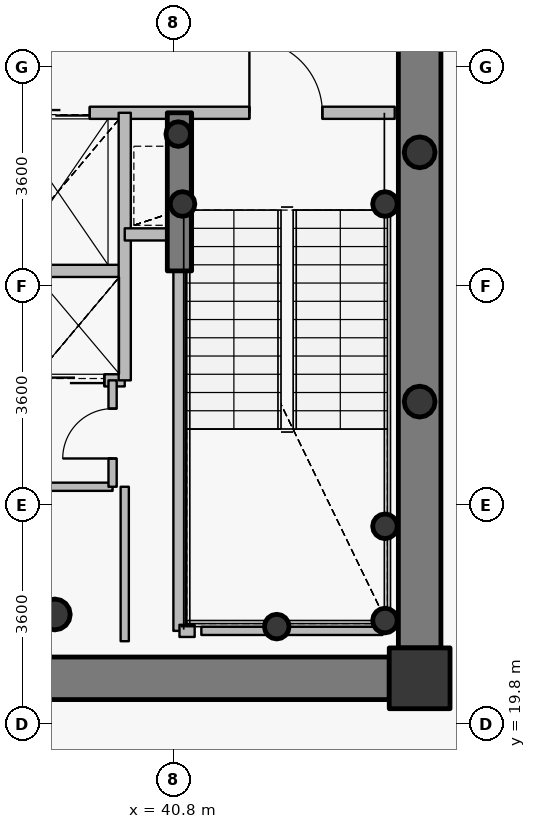
"""IFC4 building model, lengths in metres.
Left out: names, types, materials, properties, quantities, classifications, styles, units other than length and angle.
Written with IfcOpenShell. Run it as: python <this file> out.ifc"""

import sys

from ifc_helpers import new_model, si_unit, direction, frame, frame_2d, origin, origin_2d, place, context, subcontext, project, spatial, rectangle, hollow_circle, extrude, source, transform, mapped, element, fill, save


model = new_model("IFC4")
c1 = context("Model", 3, precision=1e-05, world=origin(), true_north=direction((0.0, 1.0)))
c2 = subcontext(c1, "Body", "Model", "MODEL_VIEW")
j1 = project(units=[si_unit("LENGTHUNIT", "METRE"), si_unit("PLANEANGLEUNIT", "RADIAN")], contexts=[c1])
p1 = place(None, origin())
s1 = spatial("IfcSite", under=j1, at=p1, CompositionType="ELEMENT")
p2 = place(p1, origin())
s2 = spatial("IfcBuilding", under=s1, at=p2, CompositionType="ELEMENT")
p3 = place(p2, frame((0.0, 0.0, 306.75)))
s3 = spatial("IfcBuildingStorey", under=s2, at=p3, CompositionType="ELEMENT", Elevation=306.75)
p4 = place(p3, frame((44.85, 20.55, 0.0), z_axis=(0.0, 0.0, 1.0), x_axis=(1.0, 0.0, 0.0)))
e1 = element("IfcColumn", 1, at=p4, inside=s3, PredefinedType="COLUMN", context=c2, shape_type="SweptSolid", body=[
    extrude(rectangle(XDim=1.0, YDim=1.0, at=origin_2d()), origin(), (0.0, 0.0, 1.0), 3.75),
])
p5 = place(p3, frame((38.85, 21.6, 0.0), z_axis=(0.0, 0.0, 1.0), x_axis=(1.0, 0.0, 0.0)))
e2 = element("IfcColumn", 2, at=p5, inside=s3, PredefinedType="COLUMN", context=c2, shape_type="SweptSolid", body=[
    extrude(hollow_circle(Radius=0.254, WallThickness=0.02, at=origin_2d()), origin(), (0.0, 0.0, 1.0), 3.75),
])
for number, where, z_axis, x_axis in (
    (3, (44.28, 21.5, 0.0), (0.0, 0.0, 1.0), (1.0, 0.0, 0.0)),
    (4, (44.28, 23.05, 0.0), (0.0, 0.0, 1.0), (1.0, 0.0, 0.0)),
    (5, (42.5, 21.4, 0.0), (0.0, 0.0, 1.0), (1.0, 0.0, 0.0)),
    (6, (40.95, 28.35, 0.0), (0.0, 0.0, 1.0), (1.0, 0.0, 0.0)),
    (7, (44.28, 28.35, 0.0), (0.0, 0.0, 1.0), (1.0, 0.0, 0.0)),
    (8, (40.88, 29.5, 0.0), (0.0, 0.0, 1.0), (1.0, 0.0, 0.0)),
):
    element("IfcColumn", number, at=place(p3, frame(where, z_axis=z_axis, x_axis=x_axis)), inside=s3, PredefinedType="COLUMN", context=c2, shape_type="SweptSolid", body=[
        extrude(hollow_circle(Radius=0.203, WallThickness=0.016, at=origin_2d()), origin(), (0.0, 0.0, 1.0), 3.75),
    ])
p6 = place(p3, frame((44.85, 32.95, 0.0), z_axis=(0.0, 0.0, 1.0), x_axis=(0.0, -1.0, 0.0)))
e9 = element("IfcWall", 9, at=p6, inside=s3, PredefinedType="SHEAR", context=c2, shape_type="SweptSolid", body=[
    extrude(rectangle(XDim=11.9, YDim=0.7, at=frame_2d((5.95, 0.0))), origin(), (0.0, 0.0, 1.0), 3.05),
])
p7 = place(p3, frame((44.35, 20.55, 0.0), z_axis=(0.0, 0.0, 1.0), x_axis=(-1.0, 0.0, 0.0)))
e10 = element("IfcWall", 10, at=p7, inside=s3, PredefinedType="SHEAR", context=c2, shape_type="SweptSolid", body=[
    extrude(rectangle(XDim=16.7, YDim=0.7, at=frame_2d((8.35, 0.0))), origin(), (0.0, 0.0, 1.0), 3.05),
])
p8 = place(p7, frame((12.925, 0.0, 0.0)))
e11 = element("IfcOpeningElement", 11, at=p8, cuts=e10, PredefinedType="OPENING", context=c2, shape_type="SweptSolid", body=[
    extrude(rectangle(XDim=1.15, YDim=2.15, at=origin_2d()), frame((0.575, 0.36, 1.075), z_axis=(0.0, -1.0, 0.0), x_axis=(1.0, 0.0, 0.0)), (0.0, 0.0, 1.0), 0.72),
])
p9 = place(p7, frame((9.1, 0.0, 0.0)))
e12 = element("IfcOpeningElement", 12, at=p9, cuts=e10, PredefinedType="OPENING", context=c2, shape_type="SweptSolid", body=[
    extrude(rectangle(XDim=1.15, YDim=2.15, at=origin_2d()), frame((0.575, 0.36, 1.075), z_axis=(0.0, -1.0, 0.0), x_axis=(1.0, 0.0, 0.0)), (0.0, 0.0, 1.0), 0.72),
])
p10 = place(p3, frame((40.9, 27.25, 0.0), z_axis=(0.0, 0.0, 1.0), x_axis=(0.0, 1.0, 0.0)))
e13 = element("IfcWall", 13, at=p10, inside=s3, PredefinedType="SHEAR", context=c2, shape_type="SweptSolid", body=[
    extrude(rectangle(XDim=2.6, YDim=0.4, at=frame_2d((1.3, 0.0))), origin(), (0.0, 0.0, 1.0), 3.1),
])
for number, where, z_axis, x_axis in (
    (14, (44.85, 25.1, 0.0), (0.0, 0.0, 1.0), (1.0, 0.0, 0.0)),
    (15, (44.85, 29.2, 0.0), (0.0, 0.0, 1.0), (1.0, 0.0, 0.0)),
):
    element("IfcColumn", number, at=place(p3, frame(where, z_axis=z_axis, x_axis=x_axis)), inside=s3, PredefinedType="COLUMN", context=c2, shape_type="SweptSolid", body=[
        extrude(hollow_circle(Radius=0.254, WallThickness=0.02, at=origin_2d()), origin(), (0.0, 0.0, 1.0), 3.75),
    ])
p11 = place(p3, frame((35.05, 27.25, 0.0), z_axis=(0.0, 0.0, 1.0), x_axis=(1.0, 0.0, 0.0)))
e16 = element("IfcWall", 16, at=p11, inside=s3, PredefinedType="PARTITIONING", context=c2, shape_type="SweptSolid", body=[
    extrude(rectangle(XDim=4.95, YDim=0.2, at=frame_2d((2.475, 0.0))), origin(), (0.0, 0.0, 1.0), 3.085),
])
p12 = place(p3, frame((35.45, 23.7, 0.0), z_axis=(0.0, 0.0, 1.0), x_axis=(1.0, 0.0, 0.0)))
e17 = element("IfcWall", 17, at=p12, inside=s3, PredefinedType="PARTITIONING", context=c2, shape_type="SweptSolid", body=[
    extrude(rectangle(XDim=4.35, YDim=0.135, at=frame_2d((2.175, 0.0))), origin(), (0.0, 0.0, 1.0), 3.085),
])
p13 = place(p12, frame((1.625, 0.0, 0.0)))
e18 = element("IfcOpeningElement", 18, at=p13, cuts=e17, PredefinedType="OPENING", context=c2, shape_type="SweptSolid", body=[
    extrude(rectangle(XDim=1.1, YDim=2.15, at=origin_2d()), frame((0.55, 0.078, 1.075), z_axis=(0.0, -1.0, 0.0), x_axis=(1.0, 0.0, 0.0)), (0.0, 0.0, 1.0), 0.155),
])
p14 = place(p3, frame((35.45, 25.45, 0.0), z_axis=(0.0, 0.0, 1.0), x_axis=(1.0, 0.0, 0.0)))
e19 = element("IfcWall", 19, at=p14, inside=s3, PredefinedType="PARTITIONING", context=c2, shape_type="SweptSolid", body=[
    extrude(rectangle(XDim=4.55, YDim=0.2, at=frame_2d((2.275, 0.0))), origin(), (0.0, 0.0, 1.0), 3.085),
])
p15 = place(p14, frame((0.25, 0.0, 0.0)))
e20 = element("IfcOpeningElement", 20, at=p15, cuts=e19, PredefinedType="OPENING", context=c2, shape_type="SweptSolid", body=[
    extrude(rectangle(XDim=1.05, YDim=2.15, at=origin_2d()), frame((0.525, 0.11, 1.075), z_axis=(0.0, -1.0, 0.0), x_axis=(1.0, 0.0, 0.0)), (0.0, 0.0, 1.0), 0.22),
])
p16 = place(p14, frame((1.745, 0.0, 0.0)))
e21 = element("IfcOpeningElement", 21, at=p16, cuts=e19, PredefinedType="OPENING", context=c2, shape_type="SweptSolid", body=[
    extrude(rectangle(XDim=1.05, YDim=2.15, at=origin_2d()), frame((0.525, 0.11, 1.075), z_axis=(0.0, -1.0, 0.0), x_axis=(1.0, 0.0, 0.0)), (0.0, 0.0, 1.0), 0.22),
])
p17 = place(p14, frame((3.165, 0.0, 0.0)))
e22 = element("IfcOpeningElement", 22, at=p17, cuts=e19, PredefinedType="OPENING", context=c2, shape_type="SweptSolid", body=[
    extrude(rectangle(XDim=1.05, YDim=2.15, at=origin_2d()), frame((0.525, 0.11, 1.075), z_axis=(0.0, -1.0, 0.0), x_axis=(1.0, 0.0, 0.0)), (0.0, 0.0, 1.0), 0.22),
])
p18 = place(p3, frame((35.95, 29.85, 0.0), z_axis=(0.0, 0.0, 1.0), x_axis=(1.0, 0.0, 0.0)))
e23 = element("IfcWall", 23, at=p18, inside=s3, PredefinedType="PARTITIONING", context=c2, shape_type="SweptSolid", body=[
    extrude(rectangle(XDim=8.49, YDim=0.2, at=frame_2d((4.245, 0.0))), origin(), (0.0, 0.0, 1.0), 3.085),
])
p19 = place(p18, frame((6.1, 0.0, 0.0)))
e24 = element("IfcOpeningElement", 24, at=p19, cuts=e23, PredefinedType="OPENING", context=c2, shape_type="SweptSolid", body=[
    extrude(rectangle(XDim=1.2, YDim=2.15, at=origin_2d()), frame((0.6, 0.11, 1.075), z_axis=(0.0, -1.0, 0.0), x_axis=(1.0, 0.0, 0.0)), (0.0, 0.0, 1.0), 0.22),
])
p20 = place(p18, frame((0.37, 0.0, 0.0)))
e25 = element("IfcOpeningElement", 25, at=p20, cuts=e23, PredefinedType="OPENING", context=c2, shape_type="SweptSolid", body=[
    extrude(rectangle(XDim=1.15, YDim=2.15, at=origin_2d()), frame((0.575, 0.11, 1.075), z_axis=(0.0, -1.0, 0.0), x_axis=(1.0, 0.0, 0.0)), (0.0, 0.0, 1.0), 0.22),
])
p21 = place(p18, frame((2.425, 0.0, 0.0)))
e26 = element("IfcOpeningElement", 26, at=p21, cuts=e23, PredefinedType="OPENING", context=c2, shape_type="SweptSolid", body=[
    extrude(rectangle(XDim=1.05, YDim=2.15, at=origin_2d()), frame((0.525, 0.11, 1.075), z_axis=(0.0, -1.0, 0.0), x_axis=(1.0, 0.0, 0.0)), (0.0, 0.0, 1.0), 0.22),
])
p22 = place(p3, frame((39.8, 23.7, 0.0), z_axis=(0.0, 0.0, 1.0), x_axis=(0.0, 1.0, 0.0)))
e27 = element("IfcWall", 27, at=p22, inside=s3, PredefinedType="PARTITIONING", context=c2, shape_type="SweptSolid", body=[
    extrude(rectangle(XDim=1.75, YDim=0.135, at=frame_2d((0.875, 0.0))), origin(), (0.0, 0.0, 1.0), 3.5),
])
p23 = place(p22, frame((0.465, 0.0, 0.0)))
e28 = element("IfcOpeningElement", 28, at=p23, cuts=e27, PredefinedType="OPENING", context=c2, shape_type="SweptSolid", body=[
    extrude(rectangle(XDim=0.82, YDim=2.1, at=origin_2d()), frame((0.41, 0.078, 1.05), z_axis=(0.0, -1.0, 0.0), x_axis=(1.0, 0.0, 0.0)), (0.0, 0.0, 1.0), 0.155),
])
p24 = place(p3, frame((40.0, 25.45, 0.0), z_axis=(0.0, 0.0, 1.0), x_axis=(0.0, 1.0, 0.0)))
e29 = element("IfcWall", 29, at=p24, inside=s3, PredefinedType="PARTITIONING", context=c2, shape_type="SweptSolid", body=[
    extrude(rectangle(XDim=4.4, YDim=0.2, at=frame_2d((2.2, 0.0))), origin(), (0.0, 0.0, 1.0), 3.5),
])
p25 = place(p3, frame((40.0, 27.85, 0.0), z_axis=(0.0, 0.0, 1.0), x_axis=(1.0, 0.0, 0.0)))
e30 = element("IfcWall", 30, at=p25, inside=s3, PredefinedType="PARTITIONING", context=c2, shape_type="SweptSolid", body=[
    extrude(rectangle(XDim=0.9, YDim=0.2, at=frame_2d((0.45, 0.0))), origin(), (0.0, 0.0, 1.0), 3.5),
])
p26 = place(p3, frame((40.9, 21.33, 0.0), z_axis=(0.0, 0.0, 1.0), x_axis=(0.0, 1.0, 0.0)))
e31 = element("IfcWall", 31, at=p26, inside=s3, PredefinedType="PARTITIONING", context=c2, shape_type="SweptSolid", body=[
    extrude(rectangle(XDim=5.91, YDim=0.2, at=frame_2d((2.955, 0.0))), origin(), (0.0, 0.0, 1.0), 3.035),
])
p27 = place(p3, frame((40.9, 21.33, 0.0), z_axis=(0.0, 0.0, 1.0), x_axis=(1.0, 0.0, 0.0)))
e32 = element("IfcWall", 32, at=p27, inside=s3, PredefinedType="PARTITIONING", context=c2, shape_type="SweptSolid", body=[
    extrude(rectangle(XDim=0.25, YDim=0.2, at=frame_2d((0.125, 0.0))), origin(), (0.0, 0.0, 1.0), 3.035),
])
p28 = place(p3, frame((44.24, 21.33, 0.0), z_axis=(0.0, 0.0, 1.0), x_axis=(-1.0, 0.0, 0.0)))
e33 = element("IfcWall", 33, at=p28, inside=s3, PredefinedType="PARTITIONING", context=c2, shape_type="SweptSolid", body=[
    extrude(rectangle(XDim=2.98, YDim=0.135, at=frame_2d((1.49, 0.0))), origin(), (0.0, 0.0, 1.0), 3.035),
])
p29 = place(p3, frame((40.0, 23.7, 0.0), z_axis=(0.0, 0.0, 1.0), x_axis=(0.0, -1.0, 0.0)))
e34 = element("IfcWall", 34, at=p29, inside=s3, PredefinedType="PARTITIONING", context=c2, shape_type="SweptSolid", body=[
    extrude(rectangle(XDim=2.54, YDim=0.135, at=frame_2d((1.27, 0.0))), origin(), (0.0, 0.0, 1.0), 3.035),
])
p30 = place(p3, frame((44.36, 20.2, 0.0), z_axis=(0.0, 0.0, 1.0), x_axis=(1.0, 0.0, 0.0)))
e35 = element("IfcWall", 35, at=p30, inside=s3, PredefinedType="PARTITIONING", context=c2, shape_type="SweptSolid", body=[
    extrude(rectangle(XDim=0.84, YDim=0.135, at=frame_2d((0.42, 0.0))), origin(), (0.0, 0.0, 1.0), 3.035),
])
p31 = place(p3, frame((45.2, 20.508, 0.0), z_axis=(0.0, 0.0, 1.0), x_axis=(0.0, 1.0, 0.0)))
e36 = element("IfcWall", 36, at=p31, inside=s3, PredefinedType="PARTITIONING", context=c2, shape_type="SweptSolid", body=[
    extrude(rectangle(XDim=0.532, YDim=0.135, at=frame_2d((0.266, 0.0))), origin(), (0.0, 0.0, 1.0), 3.5),
])
m1 = source(origin(), c2, "Body", "SweptSolid", [
    extrude(rectangle(XDim=1.2, YDim=2.15, at=origin_2d()), frame((0.6, 0.025, 1.075), z_axis=(0.0, -1.0, 0.0), x_axis=(1.0, 0.0, 0.0)), (0.0, 0.0, 1.0), 0.05),
])
p32 = place(p19, origin())
e37 = element("IfcDoor", 37, at=p32, inside=s3, OperationType="SINGLE_SWING_LEFT", PredefinedType="DOOR", context=c2, shape_type="MappedRepresentation", body=[
    mapped(m1, transform((0.0, 0.0, 0.0), x_axis=(1.0, 0.0, 0.0), y_axis=(0.0, 1.0, 0.0), z_axis=(0.0, 0.0, 1.0), scale=1.0)),
])
fill(e24, e37)
m2 = source(origin(), c2, "Body", "SweptSolid", [
    extrude(rectangle(XDim=1.05, YDim=2.15, at=origin_2d()), frame((0.525, 0.025, 1.075), z_axis=(0.0, -1.0, 0.0), x_axis=(1.0, 0.0, 0.0)), (0.0, 0.0, 1.0), 0.05),
])
p33 = place(p21, origin())
e38 = element("IfcDoor", 38, at=p33, inside=s3, OperationType="DOUBLE_DOOR_SLIDING", PredefinedType="USERDEFINED", context=c2, shape_type="MappedRepresentation", body=[
    mapped(m2, transform((0.0, 0.0, 0.0), x_axis=(1.0, 0.0, 0.0), y_axis=(0.0, 1.0, 0.0), z_axis=(0.0, 0.0, 1.0), scale=1.0)),
])
fill(e26, e38)
p34 = place(p17, origin())
e39 = element("IfcDoor", 39, at=p34, inside=s3, OperationType="DOUBLE_DOOR_SLIDING", PredefinedType="USERDEFINED", context=c2, shape_type="MappedRepresentation", body=[
    mapped(m2, transform((0.0, 0.0, 0.0), x_axis=(1.0, 0.0, 0.0), y_axis=(0.0, 1.0, 0.0), z_axis=(0.0, 0.0, 1.0), scale=1.0)),
])
fill(e22, e39)
m3 = source(origin(), c2, "Body", "SweptSolid", [
    extrude(rectangle(XDim=0.82, YDim=2.1, at=origin_2d()), frame((0.41, 0.025, 1.05), z_axis=(0.0, -1.0, 0.0), x_axis=(1.0, 0.0, 0.0)), (0.0, 0.0, 1.0), 0.05),
])
p35 = place(p23, origin())
e40 = element("IfcDoor", 40, at=p35, inside=s3, OperationType="SINGLE_SWING_LEFT", PredefinedType="DOOR", context=c2, shape_type="MappedRepresentation", body=[
    mapped(m3, transform((0.0, 0.0, 0.0), x_axis=(1.0, 0.0, 0.0), y_axis=(0.0, 1.0, 0.0), z_axis=(0.0, 0.0, 1.0), scale=1.0)),
])
fill(e28, e40)
save(model, sys.argv[1])
